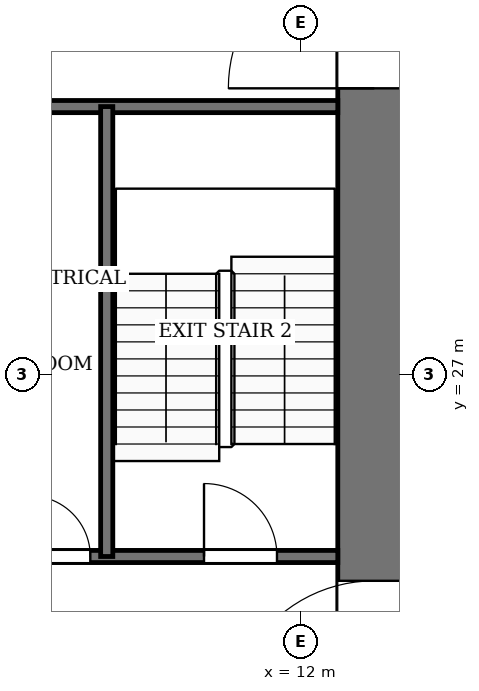
"""IFC4 building model, lengths in metres.
Left out: names, types, materials, properties, quantities, classifications, styles, units other than length and angle.
Written with IfcOpenShell. Run it as: python <this file> out.ifc"""

import sys

from ifc_helpers import new_model, si_unit, direction, frame, frame_2d, origin, place, context, subcontext, project, spatial, rectangle, extrude, element, fill, save


model = new_model("IFC4")
c1 = context("Model", 3, precision=1e-05, world=origin(), true_north=direction((0.0, 1.0)))
c2 = subcontext(c1, "Body", "Model", "MODEL_VIEW")
j1 = project(units=[si_unit("LENGTHUNIT", "METRE"), si_unit("PLANEANGLEUNIT", "RADIAN")], contexts=[c1])
p1 = place(None, origin())
s1 = spatial("IfcSite", under=j1, at=p1, CompositionType="ELEMENT")
p2 = place(p1, origin())
s2 = spatial("IfcBuilding", under=s1, at=p2, CompositionType="ELEMENT")
p3 = place(p2, frame((0.0, 0.0, 102.0)))
s3 = spatial("IfcBuildingStorey", under=s2, at=p3, CompositionType="ELEMENT", Elevation=102.0)
p4 = place(p3, frame((13.2, 18.4, -0.13), z_axis=(0.0, 0.0, 1.0), x_axis=(0.0, 1.0, 0.0)))
e1 = element("IfcWall", 1, at=p4, inside=s3, PredefinedType="SHEAR", context=c2, shape_type="SweptSolid", body=[
    extrude(rectangle(XDim=19.2, YDim=1.2, at=frame_2d((9.6, 0.0))), origin(), (0.0, 0.0, 1.0), 4.0),
])
p5 = place(p4, frame((2.8, 0.0, 0.13)))
e2 = element("IfcOpeningElement", 2, at=p5, cuts=e1, PredefinedType="OPENING", context=c2, shape_type="SweptSolid", body=[
    extrude(rectangle(XDim=2.4, YDim=2.4, at=frame_2d((1.2, 1.2))), frame((0.0, 0.61, 0.0), z_axis=(0.0, -1.0, 0.0), x_axis=(1.0, 0.0, 0.0)), (0.0, 0.0, 1.0), 1.22),
])
p6 = place(p4, frame((13.3, 0.0, 0.13)))
e3 = element("IfcOpeningElement", 3, at=p6, cuts=e1, PredefinedType="OPENING", context=c2, shape_type="SweptSolid", body=[
    extrude(rectangle(XDim=2.4, YDim=2.4, at=frame_2d((1.2, 1.2))), frame((0.0, 0.61, 0.0), z_axis=(0.0, -1.0, 0.0), x_axis=(1.0, 0.0, 0.0)), (0.0, 0.0, 1.0), 1.22),
])
p7 = place(p3, frame((6.0, 24.0, 0.0), z_axis=(0.0, 0.0, 1.0), x_axis=(1.0, 0.0, 0.0)))
e4 = element("IfcWall", 4, at=p7, inside=s3, PredefinedType="PARTITIONING", context=c2, shape_type="SweptSolid", body=[
    extrude(rectangle(XDim=6.6, YDim=0.2, at=frame_2d((3.3, 0.0))), origin(), (0.0, 0.0, 1.0), 3.87),
])
p8 = place(p7, frame((0.23, 0.0, 0.0)))
e5 = element("IfcOpeningElement", 5, at=p8, cuts=e4, PredefinedType="OPENING", context=c2, shape_type="SweptSolid", body=[
    extrude(rectangle(XDim=0.8, YDim=2.1, at=frame_2d((0.4, 1.05))), frame((0.0, 0.11, 0.0), z_axis=(0.0, -1.0, 0.0), x_axis=(1.0, 0.0, 0.0)), (0.0, 0.0, 1.0), 0.22),
])
p9 = place(p7, frame((1.53, 0.0, 0.0)))
e6 = element("IfcOpeningElement", 6, at=p9, cuts=e4, PredefinedType="OPENING", context=c2, shape_type="SweptSolid", body=[
    extrude(rectangle(XDim=1.0, YDim=2.1, at=frame_2d((0.5, 1.05))), frame((0.0, 0.11, 0.0), z_axis=(0.0, -1.0, 0.0), x_axis=(1.0, 0.0, 0.0)), (0.0, 0.0, 1.0), 0.22),
])
p10 = place(p7, frame((4.4, 0.0, 0.0)))
e7 = element("IfcOpeningElement", 7, at=p10, cuts=e4, PredefinedType="OPENING", context=c2, shape_type="SweptSolid", body=[
    extrude(rectangle(XDim=1.2, YDim=2.2, at=frame_2d((0.6, 1.1))), frame((0.0, 0.11, 0.0), z_axis=(0.0, -1.0, 0.0), x_axis=(1.0, 0.0, 0.0)), (0.0, 0.0, 1.0), 0.22),
])
p11 = place(p3, frame((6.0, 31.4, 0.0), z_axis=(0.0, 0.0, 1.0), x_axis=(1.0, 0.0, 0.0)))
e8 = element("IfcWall", 8, at=p11, inside=s3, PredefinedType="PARTITIONING", context=c2, shape_type="SweptSolid", body=[
    extrude(rectangle(XDim=6.6, YDim=0.2, at=frame_2d((3.3, 0.0))), origin(), (0.0, 0.0, 1.0), 3.87),
])
p12 = place(p3, frame((8.8, 24.0, 0.0), z_axis=(0.0, 0.0, 1.0), x_axis=(0.0, 1.0, 0.0)))
e9 = element("IfcWall", 9, at=p12, inside=s3, PredefinedType="PARTITIONING", context=c2, shape_type="SweptSolid", body=[
    extrude(rectangle(XDim=7.4, YDim=0.2, at=frame_2d((3.7, 0.0))), origin(), (0.0, 0.0, 1.0), 3.87),
])
p13 = place(p9, origin())
e10 = element("IfcDoor", 10, at=p13, inside=s3, OperationType="SINGLE_SWING_LEFT", PredefinedType="DOOR", context=c2, shape_type="SweptSolid", body=[
    extrude(rectangle(XDim=1.0, YDim=2.1, at=frame_2d((0.5, 1.05))), frame((0.0, 0.025, 0.0), z_axis=(0.0, -1.0, 0.0), x_axis=(1.0, 0.0, 0.0)), (0.0, 0.0, 1.0), 0.05),
])
fill(e6, e10)
p14 = place(p10, origin())
e11 = element("IfcDoor", 11, at=p14, inside=s3, OperationType="SINGLE_SWING_LEFT", PredefinedType="DOOR", context=c2, shape_type="SweptSolid", body=[
    extrude(rectangle(XDim=1.2, YDim=2.2, at=frame_2d((0.6, 1.1))), frame((0.0, 0.025, 0.0), z_axis=(0.0, -1.0, 0.0), x_axis=(1.0, 0.0, 0.0)), (0.0, 0.0, 1.0), 0.05),
])
fill(e7, e11)
p15 = place(p5, origin())
e12 = element("IfcDoor", 12, at=p15, inside=s3, OperationType="DOUBLE_DOOR_SINGLE_SWING", PredefinedType="DOOR", context=c2, shape_type="SweptSolid", body=[
    extrude(rectangle(XDim=2.4, YDim=2.4, at=frame_2d((1.2, 1.2))), frame((0.0, 0.025, 0.0), z_axis=(0.0, -1.0, 0.0), x_axis=(1.0, 0.0, 0.0)), (0.0, 0.0, 1.0), 0.05),
])
fill(e2, e12)
p16 = place(p6, origin())
e13 = element("IfcDoor", 13, at=p16, inside=s3, OperationType="DOUBLE_DOOR_SINGLE_SWING", PredefinedType="DOOR", context=c2, shape_type="SweptSolid", body=[
    extrude(rectangle(XDim=2.4, YDim=2.4, at=frame_2d((1.2, 1.2))), frame((0.0, 0.025, 0.0), z_axis=(0.0, -1.0, 0.0), x_axis=(1.0, 0.0, 0.0)), (0.0, 0.0, 1.0), 0.05),
])
fill(e3, e13)
save(model, sys.argv[1])
